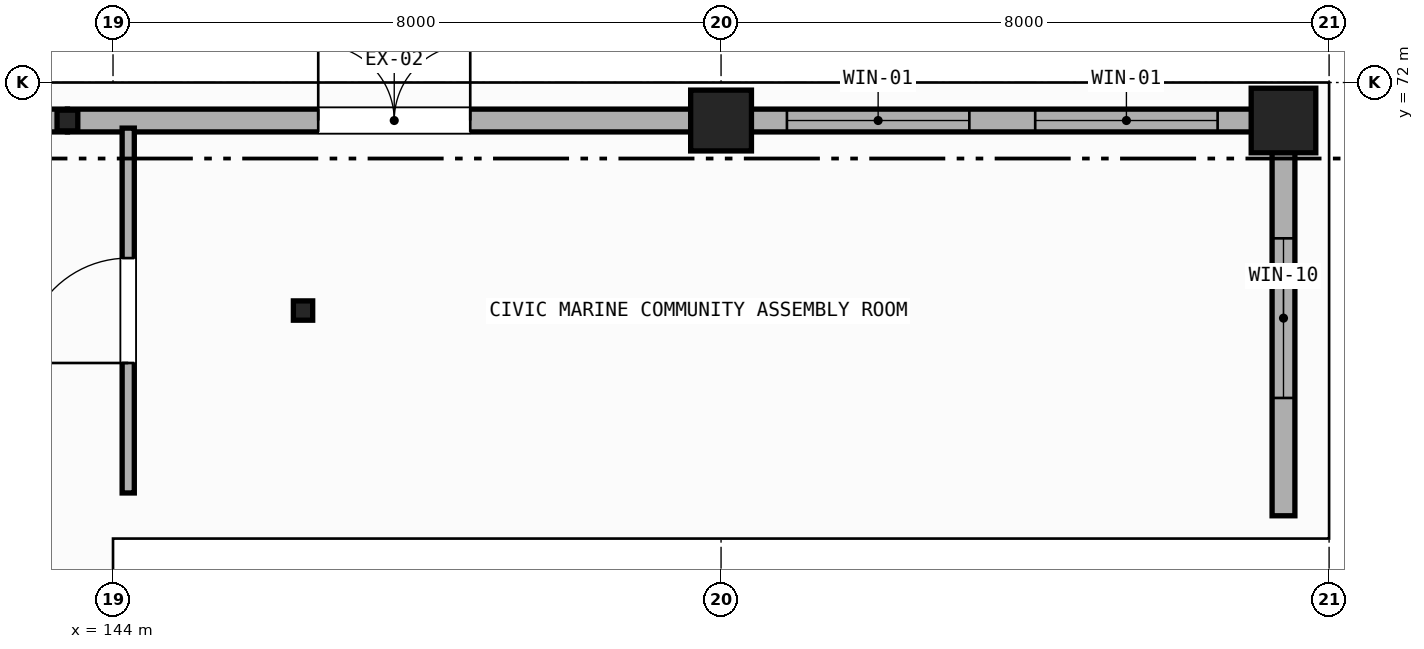
"""IFC4 building model, lengths in metres.
Left out: names, types, materials, properties, quantities, classifications, styles, units other than length and angle.
Written with IfcOpenShell. Run it as: python <this file> out.ifc"""

import sys

from ifc_helpers import new_model, si_unit, direction, frame, frame_2d, origin, origin_2d, place, context, subcontext, project, spatial, rectangle, hollow_rectangle, circle, hollow_circle, extrude, element, fill, save


model = new_model("IFC4")
c1 = context("Model", 3, precision=1e-05, world=origin(), true_north=direction((0.0, 1.0)))
c2 = subcontext(c1, "Body", "Model", "MODEL_VIEW")
j1 = project(units=[si_unit("LENGTHUNIT", "METRE"), si_unit("PLANEANGLEUNIT", "RADIAN")], contexts=[c1])
p1 = place(None, origin())
s1 = spatial("IfcSite", under=j1, at=p1, CompositionType="ELEMENT")
p2 = place(p1, origin())
s2 = spatial("IfcBuilding", under=s1, at=p2, CompositionType="ELEMENT")
p3 = place(p2, origin())
s3 = spatial("IfcBuildingStorey", under=s2, at=p3, CompositionType="ELEMENT", Elevation=0.0)
p4 = place(p3, frame((143.4, 71.5, 0.0), z_axis=(0.0, 0.0, 1.0), x_axis=(0.0, 1.0, 0.0)))
e1 = element("IfcColumn", 1, at=p4, inside=s3, PredefinedType="COLUMN", context=c2, shape_type="SweptSolid", body=[
    extrude(hollow_circle(Radius=0.136, WallThickness=0.012, at=origin_2d()), origin(), (0.0, 0.0, 1.0), 5.12),
])
p5 = place(p3, frame((152.0, 71.5, 0.0), z_axis=(0.0, 0.0, 1.0), x_axis=(1.0, 0.0, 0.0)))
e2 = element("IfcColumn", 2, at=p5, inside=s3, PredefinedType="COLUMN", context=c2, shape_type="SweptSolid", body=[
    extrude(rectangle(XDim=0.8, YDim=0.8, at=origin_2d()), origin(), (0.0, 0.0, 1.0), 5.19),
])
p6 = place(p3, frame((159.4, 71.5, 0.0), z_axis=(0.0, 0.0, 1.0), x_axis=(0.0, 1.0, 0.0)))
e3 = element("IfcColumn", 3, at=p6, inside=s3, PredefinedType="COLUMN", context=c2, shape_type="SweptSolid", body=[
    extrude(circle(Radius=0.425, at=origin_2d()), origin(), (0.0, 0.0, 1.0), 5.19),
])
p7 = place(p3, frame((146.5, 69.0, -2.4), z_axis=(0.0, 0.0, 1.0), x_axis=(1.0, 0.0, 0.0)))
e4 = element("IfcColumn", 4, at=p7, inside=s3, PredefinedType="COLUMN", context=c2, shape_type="SweptSolid", body=[
    extrude(hollow_rectangle(XDim=0.254, YDim=0.254, WallThickness=0.012, InnerFilletRadius=0.012, OuterFilletRadius=0.024, at=origin_2d()), origin(), (0.0, 0.0, 1.0), 7.59),
])
p8 = place(p3, frame((136.0, 71.5, 0.0), z_axis=(0.0, 0.0, 1.0), x_axis=(1.0, 0.0, 0.0)))
e5 = element("IfcWall", 5, at=p8, inside=s3, PredefinedType="STANDARD", context=c2, shape_type="SweptSolid", body=[
    extrude(rectangle(XDim=7.4, YDim=0.3, at=frame_2d((3.7, 0.0))), origin(), (0.0, 0.0, 1.0), 4.28),
])
p9 = place(p8, frame((1.133, 0.0, 1.05)))
e6 = element("IfcOpeningElement", 6, at=p9, cuts=e5, PredefinedType="OPENING", context=c2, shape_type="SweptSolid", body=[
    extrude(rectangle(XDim=2.0, YDim=1.85, at=frame_2d((1.0, 0.925))), frame((0.0, 0.16, 0.0), z_axis=(0.0, -1.0, 0.0), x_axis=(1.0, 0.0, 0.0)), (0.0, 0.0, 1.0), 0.32),
])
p10 = place(p8, frame((4.267, 0.0, 1.05)))
e7 = element("IfcOpeningElement", 7, at=p10, cuts=e5, PredefinedType="OPENING", context=c2, shape_type="SweptSolid", body=[
    extrude(rectangle(XDim=2.0, YDim=1.85, at=frame_2d((1.0, 0.925))), frame((0.0, 0.16, 0.0), z_axis=(0.0, -1.0, 0.0), x_axis=(1.0, 0.0, 0.0)), (0.0, 0.0, 1.0), 0.32),
])
p11 = place(p3, frame((143.4, 71.5, 0.0), z_axis=(0.0, 0.0, 1.0), x_axis=(1.0, 0.0, 0.0)))
e8 = element("IfcWall", 8, at=p11, inside=s3, PredefinedType="STANDARD", context=c2, shape_type="SweptSolid", body=[
    extrude(rectangle(XDim=8.6, YDim=0.3, at=frame_2d((4.3, 0.0))), origin(), (0.0, 0.0, 1.0), 4.402),
])
p12 = place(p11, frame((3.3, 0.0, 0.0)))
e9 = element("IfcOpeningElement", 9, at=p12, cuts=e8, PredefinedType="OPENING", context=c2, shape_type="SweptSolid", body=[
    extrude(rectangle(XDim=2.0, YDim=2.5, at=frame_2d((1.0, 1.25))), frame((0.0, 0.16, 0.0), z_axis=(0.0, -1.0, 0.0), x_axis=(1.0, 0.0, 0.0)), (0.0, 0.0, 1.0), 0.32),
])
p13 = place(p3, frame((152.0, 71.5, 0.0), z_axis=(0.0, 0.0, 1.0), x_axis=(1.0, 0.0, 0.0)))
e10 = element("IfcWall", 10, at=p13, inside=s3, PredefinedType="STANDARD", context=c2, shape_type="SweptSolid", body=[
    extrude(rectangle(XDim=7.4, YDim=0.3, at=frame_2d((3.7, 0.0))), origin(), (0.0, 0.0, 1.0), 4.8),
])
p14 = place(p13, frame((0.867, 0.0, 0.85)))
e11 = element("IfcOpeningElement", 11, at=p14, cuts=e10, PredefinedType="OPENING", context=c2, shape_type="SweptSolid", body=[
    extrude(rectangle(XDim=2.4, YDim=2.9, at=frame_2d((1.2, 1.45))), frame((0.0, 0.16, 0.0), z_axis=(0.0, -1.0, 0.0), x_axis=(1.0, 0.0, 0.0)), (0.0, 0.0, 1.0), 0.32),
])
p15 = place(p13, frame((4.133, 0.0, 0.85)))
e12 = element("IfcOpeningElement", 12, at=p15, cuts=e10, PredefinedType="OPENING", context=c2, shape_type="SweptSolid", body=[
    extrude(rectangle(XDim=2.4, YDim=2.9, at=frame_2d((1.2, 1.45))), frame((0.0, 0.16, 0.0), z_axis=(0.0, -1.0, 0.0), x_axis=(1.0, 0.0, 0.0)), (0.0, 0.0, 1.0), 0.32),
])
p16 = place(p3, frame((159.4, 66.3, 0.0), z_axis=(0.0, 0.0, 1.0), x_axis=(0.0, 1.0, 0.0)))
e13 = element("IfcWall", 13, at=p16, inside=s3, PredefinedType="STANDARD", context=c2, shape_type="SweptSolid", body=[
    extrude(rectangle(XDim=5.2, YDim=0.3, at=frame_2d((2.6, 0.0))), origin(), (0.0, 0.0, 1.0), 4.92),
])
p17 = place(p16, frame((1.55, 0.0, 1.0)))
e14 = element("IfcOpeningElement", 14, at=p17, cuts=e13, PredefinedType="OPENING", context=c2, shape_type="SweptSolid", body=[
    extrude(rectangle(XDim=2.1, YDim=1.9, at=frame_2d((1.05, 0.95))), frame((0.0, 0.16, 0.0), z_axis=(0.0, -1.0, 0.0), x_axis=(1.0, 0.0, 0.0)), (0.0, 0.0, 1.0), 0.32),
])
p18 = place(p3, frame((144.2, 66.6, 0.0), z_axis=(0.0, 0.0, 1.0), x_axis=(0.0, 1.0, 0.0)))
e15 = element("IfcWall", 15, at=p18, inside=s3, PredefinedType="PARTITIONING", context=c2, shape_type="SweptSolid", body=[
    extrude(rectangle(XDim=4.8, YDim=0.16, at=frame_2d((2.4, 0.0))), origin(), (0.0, 0.0, 1.0), 4.29),
])
p19 = place(p18, frame((1.71, 0.0, 0.0)))
e16 = element("IfcOpeningElement", 16, at=p19, cuts=e15, PredefinedType="OPENING", context=c2, shape_type="SweptSolid", body=[
    extrude(rectangle(XDim=1.38, YDim=2.25, at=frame_2d((0.69, 1.125))), frame((0.0, 0.09, 0.0), z_axis=(0.0, -1.0, 0.0), x_axis=(1.0, 0.0, 0.0)), (0.0, 0.0, 1.0), 0.18),
])
p20 = place(p12, origin())
e17 = element("IfcDoor", 17, at=p20, inside=s3, OperationType="DOUBLE_DOOR_SINGLE_SWING", PredefinedType="DOOR", context=c2, shape_type="SweptSolid", body=[
    extrude(rectangle(XDim=2.0, YDim=2.5, at=frame_2d((1.0, 1.25))), frame((0.0, 0.025, 0.0), z_axis=(0.0, -1.0, 0.0), x_axis=(1.0, 0.0, 0.0)), (0.0, 0.0, 1.0), 0.05),
])
fill(e9, e17)
p21 = place(p14, origin())
e18 = element("IfcWindow", 18, at=p21, inside=s3, PartitioningType="SINGLE_PANEL", PredefinedType="WINDOW", context=c2, shape_type="SweptSolid", body=[
    extrude(rectangle(XDim=2.4, YDim=2.9, at=frame_2d((1.2, 1.45))), frame((0.0, 0.03, 0.0), z_axis=(0.0, -1.0, 0.0), x_axis=(1.0, 0.0, 0.0)), (0.0, 0.0, 1.0), 0.06),
])
fill(e11, e18)
p22 = place(p15, origin())
e19 = element("IfcWindow", 19, at=p22, inside=s3, PartitioningType="SINGLE_PANEL", PredefinedType="WINDOW", context=c2, shape_type="SweptSolid", body=[
    extrude(rectangle(XDim=2.4, YDim=2.9, at=frame_2d((1.2, 1.45))), frame((0.0, 0.03, 0.0), z_axis=(0.0, -1.0, 0.0), x_axis=(1.0, 0.0, 0.0)), (0.0, 0.0, 1.0), 0.06),
])
fill(e12, e19)
p23 = place(p17, origin())
e20 = element("IfcWindow", 20, at=p23, inside=s3, PartitioningType="SINGLE_PANEL", PredefinedType="WINDOW", context=c2, shape_type="SweptSolid", body=[
    extrude(rectangle(XDim=2.1, YDim=1.9, at=frame_2d((1.05, 0.95))), frame((0.0, 0.03, 0.0), z_axis=(0.0, -1.0, 0.0), x_axis=(1.0, 0.0, 0.0)), (0.0, 0.0, 1.0), 0.06),
])
fill(e14, e20)
p24 = place(p19, origin())
e21 = element("IfcDoor", 21, at=p24, inside=s3, OperationType="SINGLE_SWING_LEFT", PredefinedType="DOOR", context=c2, shape_type="SweptSolid", body=[
    extrude(rectangle(XDim=1.38, YDim=2.25, at=frame_2d((0.69, 1.125))), frame((0.0, 0.025, 0.0), z_axis=(0.0, -1.0, 0.0), x_axis=(1.0, 0.0, 0.0)), (0.0, 0.0, 1.0), 0.05),
])
fill(e16, e21)
save(model, sys.argv[1])
